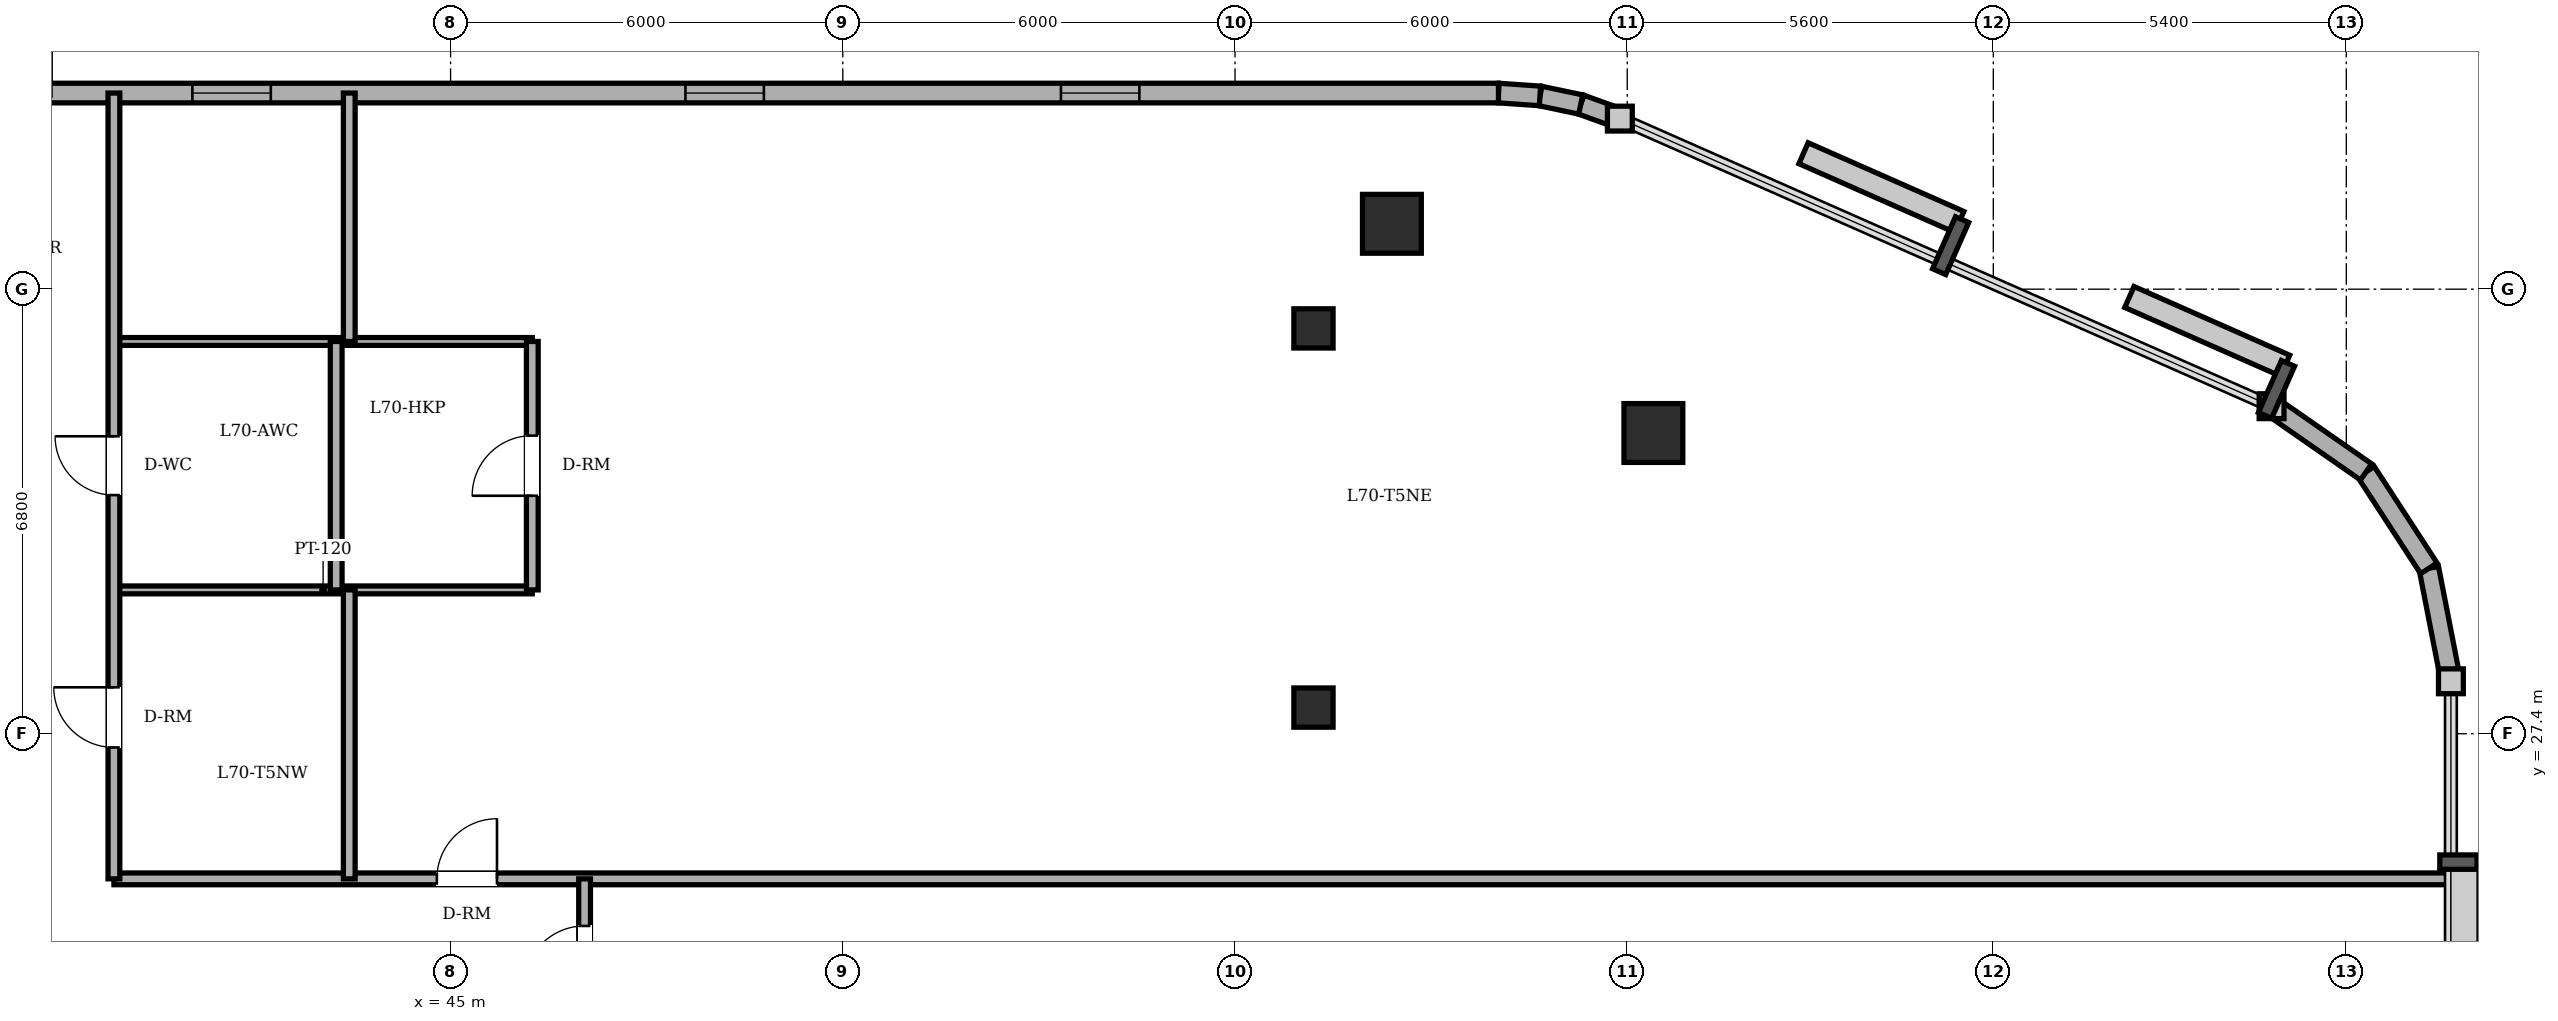
"""IFC4 building model, lengths in metres.
Left out: names, types, materials, properties, quantities, classifications, styles, units other than length and angle.
Written with IfcOpenShell. Run it as: python <this file> out.ifc"""

import sys

from ifc_helpers import new_model, si_unit, direction, frame, frame_2d, origin, origin_2d, place, context, subcontext, project, spatial, rectangle, circle, extrude, element, fill, save


model = new_model("IFC4")
c1 = context("Model", 3, precision=1e-05, world=origin(), true_north=direction((0.0, 1.0)))
c2 = subcontext(c1, "Body", "Model", "MODEL_VIEW")
j1 = project(units=[si_unit("LENGTHUNIT", "METRE"), si_unit("PLANEANGLEUNIT", "RADIAN")], contexts=[c1])
p1 = place(None, origin())
s1 = spatial("IfcSite", under=j1, at=p1, CompositionType="ELEMENT")
p2 = place(p1, origin())
s2 = spatial("IfcBuilding", under=s1, at=p2, CompositionType="ELEMENT")
p3 = place(p2, frame((0.0, 0.0, 269.75)))
s3 = spatial("IfcBuildingStorey", under=s2, at=p3, CompositionType="ELEMENT", Elevation=269.75)
for number, where, z_axis, x_axis in (
    (1, (63.4, 32.0, 0.0), (0.0, 0.0, 1.0), (1.0, 0.0, 0.0)),
    (2, (59.4, 35.2, 0.0), (0.0, 0.0, 1.0), (1.0, 0.0, 0.0)),
):
    element("IfcColumn", number, at=place(p3, frame(where, z_axis=z_axis, x_axis=x_axis)), inside=s3, PredefinedType="COLUMN", context=c2, shape_type="SweptSolid", body=[
        extrude(circle(Radius=0.45, at=origin_2d()), origin(), (0.0, 0.0, 1.0), 3.65),
    ])
for number, where, z_axis, x_axis in (
    (3, (58.2, 27.8, 0.0), (0.0, 0.0, 1.0), (1.0, 0.0, 0.0)),
    (4, (58.2, 33.6, 0.0), (0.0, 0.0, 1.0), (1.0, 0.0, 0.0)),
):
    element("IfcColumn", number, at=place(p3, frame(where, z_axis=z_axis, x_axis=x_axis)), inside=s3, PredefinedType="COLUMN", context=c2, shape_type="SweptSolid", body=[
        extrude(rectangle(XDim=0.6, YDim=0.6, at=origin_2d()), origin(), (0.0, 0.0, 1.0), 3.65),
    ])
for number, where, z_axis, x_axis in (
    (5, (75.6, 28.202, 0.0), (0.0, 0.0, 1.0), (-0.192, 0.981, 0.0)),
    (6, (75.263, 29.93, 0.0), (0.0, 0.0, 1.0), (-0.546, 0.838, 0.0)),
):
    element("IfcWall", number, at=place(p3, frame(where, z_axis=z_axis, x_axis=x_axis)), inside=s3, PredefinedType="SOLIDWALL", context=c2, shape_type="SweptSolid", body=[
        extrude(rectangle(XDim=1.76, YDim=0.3, at=frame_2d((0.88, 0.0))), origin(), (0.0, 0.0, 1.0), 3.45),
    ])
p4 = place(p3, frame((74.302, 31.405, 0.0), z_axis=(0.0, 0.0, 1.0), x_axis=(-0.821006966142, 0.570918174124, 0.0)))
e7 = element("IfcWall", 7, at=p4, inside=s3, PredefinedType="SOLIDWALL", context=c2, shape_type="SweptSolid", body=[
    extrude(rectangle(XDim=1.76, YDim=0.3, at=frame_2d((0.88, 0.0))), origin(), (0.0, 0.0, 1.0), 3.45),
])
p5 = place(p3, frame((62.887, 36.809, 0.0), z_axis=(0.0, 0.0, 1.0), x_axis=(-0.94077491148, 0.339031806665, 0.0)))
e8 = element("IfcWall", 8, at=p5, inside=s3, PredefinedType="SOLIDWALL", context=c2, shape_type="SweptSolid", body=[
    extrude(rectangle(XDim=0.636, YDim=0.3, at=frame_2d((0.318, 0.0))), origin(), (0.0, 0.0, 1.0), 3.45),
])
p6 = place(p3, frame((62.288, 37.025, 0.0), z_axis=(0.0, 0.0, 1.0), x_axis=(-0.97857012251, 0.205913854149, 0.0)))
e9 = element("IfcWall", 9, at=p6, inside=s3, PredefinedType="SOLIDWALL", context=c2, shape_type="SweptSolid", body=[
    extrude(rectangle(XDim=0.637, YDim=0.3, at=frame_2d((0.318, 0.0))), origin(), (0.0, 0.0, 1.0), 3.45),
])
p7 = place(p3, frame((61.665, 37.156, 0.0), z_axis=(0.0, 0.0, 1.0), x_axis=(-0.997613959688, 0.069039028352, 0.0)))
e10 = element("IfcWall", 10, at=p7, inside=s3, PredefinedType="SOLIDWALL", context=c2, shape_type="SweptSolid", body=[
    extrude(rectangle(XDim=0.636, YDim=0.3, at=frame_2d((0.318, 0.0))), origin(), (0.0, 0.0, 1.0), 3.45),
])
p8 = place(p3, frame((61.03, 37.2, 0.0), z_axis=(0.0, 0.0, 1.0), x_axis=(-1.0, 0.0, 0.0)))
e11 = element("IfcWall", 11, at=p8, inside=s3, PredefinedType="SOLIDWALL", context=c2, shape_type="SweptSolid", body=[
    extrude(rectangle(XDim=37.03, YDim=0.3, at=frame_2d((18.515, 0.0))), origin(), (0.0, 0.0, 1.0), 3.45),
])
p9 = place(p8, frame((31.03, 0.0, 0.0)))
e12 = element("IfcOpeningElement", 12, at=p9, cuts=e11, PredefinedType="OPENING", context=c2, shape_type="SweptSolid", body=[
    extrude(rectangle(XDim=0.95, YDim=2.2, at=frame_2d((0.475, 1.1))), frame((0.0, 0.16, 0.0), z_axis=(0.0, -1.0, 0.0), x_axis=(1.0, 0.0, 0.0)), (0.0, 0.0, 1.0), 0.32),
])
p10 = place(p8, frame((5.493, 0.0, 0.85)))
e13 = element("IfcOpeningElement", 13, at=p10, cuts=e11, PredefinedType="OPENING", context=c2, shape_type="SweptSolid", body=[
    extrude(rectangle(XDim=1.2, YDim=1.6, at=frame_2d((0.6, 0.8))), frame((0.0, 0.16, 0.0), z_axis=(0.0, -1.0, 0.0), x_axis=(1.0, 0.0, 0.0)), (0.0, 0.0, 1.0), 0.32),
])
p11 = place(p8, frame((11.237, 0.0, 0.85)))
e14 = element("IfcOpeningElement", 14, at=p11, cuts=e11, PredefinedType="OPENING", context=c2, shape_type="SweptSolid", body=[
    extrude(rectangle(XDim=1.2, YDim=1.6, at=frame_2d((0.6, 0.8))), frame((0.0, 0.16, 0.0), z_axis=(0.0, -1.0, 0.0), x_axis=(1.0, 0.0, 0.0)), (0.0, 0.0, 1.0), 0.32),
])
p12 = place(p8, frame((18.78, 0.0, 0.85)))
e15 = element("IfcOpeningElement", 15, at=p12, cuts=e11, PredefinedType="OPENING", context=c2, shape_type="SweptSolid", body=[
    extrude(rectangle(XDim=1.2, YDim=1.6, at=frame_2d((0.6, 0.8))), frame((0.0, 0.16, 0.0), z_axis=(0.0, -1.0, 0.0), x_axis=(1.0, 0.0, 0.0)), (0.0, 0.0, 1.0), 0.32),
])
p13 = place(p8, frame((25.747, 0.0, 0.85)))
e16 = element("IfcOpeningElement", 16, at=p13, cuts=e11, PredefinedType="OPENING", context=c2, shape_type="SweptSolid", body=[
    extrude(rectangle(XDim=1.2, YDim=1.6, at=frame_2d((0.6, 0.8))), frame((0.0, 0.16, 0.0), z_axis=(0.0, -1.0, 0.0), x_axis=(1.0, 0.0, 0.0)), (0.0, 0.0, 1.0), 0.32),
])
p14 = place(p3, frame((39.85, 25.18, 0.0), z_axis=(0.0, 0.0, 1.0), x_axis=(1.0, 0.0, 0.0)))
e17 = element("IfcWall", 17, at=p14, inside=s3, PredefinedType="PARTITIONING", context=c2, shape_type="SweptSolid", body=[
    extrude(rectangle(XDim=35.75, YDim=0.18, at=frame_2d((17.875, 0.0))), origin(), (0.0, 0.0, 1.0), 3.45),
])
p15 = place(p14, frame((4.94, 0.0, 0.0)))
e18 = element("IfcOpeningElement", 18, at=p15, cuts=e17, PredefinedType="OPENING", context=c2, shape_type="SweptSolid", body=[
    extrude(rectangle(XDim=0.92, YDim=2.1, at=frame_2d((0.46, 1.05))), frame((0.0, 0.1, 0.0), z_axis=(0.0, -1.0, 0.0), x_axis=(1.0, 0.0, 0.0)), (0.0, 0.0, 1.0), 0.2),
])
p16 = place(p3, frame((39.85, 29.6, 0.0), z_axis=(0.0, 0.0, 1.0), x_axis=(1.0, 0.0, 0.0)))
e19 = element("IfcWall", 19, at=p16, inside=s3, PredefinedType="PARTITIONING", context=c2, shape_type="SweptSolid", body=[
    extrude(rectangle(XDim=6.4, YDim=0.12, at=frame_2d((3.2, 0.0))), origin(), (0.0, 0.0, 1.0), 3.45),
])
p17 = place(p3, frame((39.85, 33.4, 0.0), z_axis=(0.0, 0.0, 1.0), x_axis=(1.0, 0.0, 0.0)))
e20 = element("IfcWall", 20, at=p17, inside=s3, PredefinedType="PARTITIONING", context=c2, shape_type="SweptSolid", body=[
    extrude(rectangle(XDim=6.4, YDim=0.12, at=frame_2d((3.2, 0.0))), origin(), (0.0, 0.0, 1.0), 3.092),
])
p18 = place(p3, frame((39.85, 25.18, 0.0), z_axis=(0.0, 0.0, 1.0), x_axis=(0.0, 1.0, 0.0)))
e21 = element("IfcWall", 21, at=p18, inside=s3, PredefinedType="PARTITIONING", context=c2, shape_type="SweptSolid", body=[
    extrude(rectangle(XDim=12.02, YDim=0.18, at=frame_2d((6.01, 0.0))), origin(), (0.0, 0.0, 1.0), 3.45),
])
p19 = place(p18, frame((5.87, 0.0, 0.0)))
e22 = element("IfcOpeningElement", 22, at=p19, cuts=e21, PredefinedType="OPENING", context=c2, shape_type="SweptSolid", body=[
    extrude(rectangle(XDim=0.9, YDim=2.1, at=frame_2d((0.45, 1.05))), frame((0.0, 0.1, 0.0), z_axis=(0.0, -1.0, 0.0), x_axis=(1.0, 0.0, 0.0)), (0.0, 0.0, 1.0), 0.2),
])
p20 = place(p18, frame((2.01, 0.0, 0.0)))
e23 = element("IfcOpeningElement", 23, at=p20, cuts=e21, PredefinedType="OPENING", context=c2, shape_type="SweptSolid", body=[
    extrude(rectangle(XDim=0.92, YDim=2.1, at=frame_2d((0.46, 1.05))), frame((0.0, 0.1, 0.0), z_axis=(0.0, -1.0, 0.0), x_axis=(1.0, 0.0, 0.0)), (0.0, 0.0, 1.0), 0.2),
])
p21 = place(p3, frame((43.25, 29.6, 0.0), z_axis=(0.0, 0.0, 1.0), x_axis=(0.0, 1.0, 0.0)))
e24 = element("IfcWall", 24, at=p21, inside=s3, PredefinedType="PARTITIONING", context=c2, shape_type="SweptSolid", body=[
    extrude(rectangle(XDim=3.8, YDim=0.18, at=frame_2d((1.9, 0.0))), origin(), (0.0, 0.0, 1.0), 3.45),
])
p22 = place(p3, frame((43.45, 25.18, 0.0), z_axis=(0.0, 0.0, 1.0), x_axis=(0.0, 1.0, 0.0)))
e25 = element("IfcWall", 25, at=p22, inside=s3, PredefinedType="PARTITIONING", context=c2, shape_type="SweptSolid", body=[
    extrude(rectangle(XDim=4.42, YDim=0.18, at=frame_2d((2.21, 0.0))), origin(), (0.0, 0.0, 1.0), 3.45),
])
p23 = place(p3, frame((43.45, 33.4, 0.0), z_axis=(0.0, 0.0, 1.0), x_axis=(0.0, 1.0, 0.0)))
e26 = element("IfcWall", 26, at=p23, inside=s3, PredefinedType="PARTITIONING", context=c2, shape_type="SweptSolid", body=[
    extrude(rectangle(XDim=3.8, YDim=0.18, at=frame_2d((1.9, 0.0))), origin(), (0.0, 0.0, 1.0), 3.45),
])
p24 = place(p3, frame((46.25, 29.6, 0.0), z_axis=(0.0, 0.0, 1.0), x_axis=(0.0, 1.0, 0.0)))
e27 = element("IfcWall", 27, at=p24, inside=s3, PredefinedType="PARTITIONING", context=c2, shape_type="SweptSolid", body=[
    extrude(rectangle(XDim=3.8, YDim=0.18, at=frame_2d((1.9, 0.0))), origin(), (0.0, 0.0, 1.0), 3.45),
])
p25 = place(p24, frame((1.44, 0.0, 0.0)))
e28 = element("IfcOpeningElement", 28, at=p25, cuts=e27, PredefinedType="OPENING", context=c2, shape_type="SweptSolid", body=[
    extrude(rectangle(XDim=0.92, YDim=2.1, at=frame_2d((0.46, 1.05))), frame((0.0, 0.1, 0.0), z_axis=(0.0, -1.0, 0.0), x_axis=(1.0, 0.0, 0.0)), (0.0, 0.0, 1.0), 0.2),
])
p26 = place(p3, frame((47.05, 22.82, 0.0), z_axis=(0.0, 0.0, 1.0), x_axis=(0.0, 1.0, 0.0)))
e29 = element("IfcWall", 29, at=p26, inside=s3, PredefinedType="PARTITIONING", context=c2, shape_type="SweptSolid", body=[
    extrude(rectangle(XDim=2.36, YDim=0.18, at=frame_2d((1.18, 0.0))), origin(), (0.0, 0.0, 1.0), 3.45),
])
p27 = place(p26, frame((0.72, 0.0, 0.0)))
e30 = element("IfcOpeningElement", 30, at=p27, cuts=e29, PredefinedType="OPENING", context=c2, shape_type="SweptSolid", body=[
    extrude(rectangle(XDim=0.92, YDim=2.1, at=frame_2d((0.46, 1.05))), frame((0.0, 0.1, 0.0), z_axis=(0.0, -1.0, 0.0), x_axis=(1.0, 0.0, 0.0)), (0.0, 0.0, 1.0), 0.2),
])
p28 = place(p10, origin())
e31 = element("IfcWindow", 31, at=p28, inside=s3, PartitioningType="SINGLE_PANEL", PredefinedType="WINDOW", context=c2, shape_type="SweptSolid", body=[
    extrude(rectangle(XDim=1.2, YDim=1.6, at=frame_2d((0.6, 0.8))), frame((0.0, 0.03, 0.0), z_axis=(0.0, -1.0, 0.0), x_axis=(1.0, 0.0, 0.0)), (0.0, 0.0, 1.0), 0.06),
])
fill(e13, e31)
p29 = place(p11, origin())
e32 = element("IfcWindow", 32, at=p29, inside=s3, PartitioningType="SINGLE_PANEL", PredefinedType="WINDOW", context=c2, shape_type="SweptSolid", body=[
    extrude(rectangle(XDim=1.2, YDim=1.6, at=frame_2d((0.6, 0.8))), frame((0.0, 0.03, 0.0), z_axis=(0.0, -1.0, 0.0), x_axis=(1.0, 0.0, 0.0)), (0.0, 0.0, 1.0), 0.06),
])
fill(e14, e32)
p30 = place(p12, origin())
e33 = element("IfcWindow", 33, at=p30, inside=s3, PartitioningType="SINGLE_PANEL", PredefinedType="WINDOW", context=c2, shape_type="SweptSolid", body=[
    extrude(rectangle(XDim=1.2, YDim=1.6, at=frame_2d((0.6, 0.8))), frame((0.0, 0.03, 0.0), z_axis=(0.0, -1.0, 0.0), x_axis=(1.0, 0.0, 0.0)), (0.0, 0.0, 1.0), 0.06),
])
fill(e15, e33)
p31 = place(p19, origin())
e34 = element("IfcDoor", 34, at=p31, inside=s3, OperationType="SINGLE_SWING_RIGHT", PredefinedType="DOOR", context=c2, shape_type="SweptSolid", body=[
    extrude(rectangle(XDim=0.9, YDim=2.1, at=frame_2d((0.45, 1.05))), frame((0.0, 0.025, 0.0), z_axis=(0.0, -1.0, 0.0), x_axis=(1.0, 0.0, 0.0)), (0.0, 0.0, 1.0), 0.05),
])
fill(e22, e34)
p32 = place(p20, origin())
e35 = element("IfcDoor", 35, at=p32, inside=s3, OperationType="SINGLE_SWING_RIGHT", PredefinedType="DOOR", context=c2, shape_type="SweptSolid", body=[
    extrude(rectangle(XDim=0.92, YDim=2.1, at=frame_2d((0.46, 1.05))), frame((0.0, 0.025, 0.0), z_axis=(0.0, -1.0, 0.0), x_axis=(1.0, 0.0, 0.0)), (0.0, 0.0, 1.0), 0.05),
])
fill(e23, e35)
p33 = place(p15, origin())
e36 = element("IfcDoor", 36, at=p33, inside=s3, OperationType="SINGLE_SWING_RIGHT", PredefinedType="DOOR", context=c2, shape_type="SweptSolid", body=[
    extrude(rectangle(XDim=0.92, YDim=2.1, at=frame_2d((0.46, 1.05))), frame((0.0, 0.025, 0.0), z_axis=(0.0, -1.0, 0.0), x_axis=(1.0, 0.0, 0.0)), (0.0, 0.0, 1.0), 0.05),
])
fill(e18, e36)
p34 = place(p27, origin())
e37 = element("IfcDoor", 37, at=p34, inside=s3, OperationType="SINGLE_SWING_LEFT", PredefinedType="DOOR", context=c2, shape_type="SweptSolid", body=[
    extrude(rectangle(XDim=0.92, YDim=2.1, at=frame_2d((0.46, 1.05))), frame((0.0, 0.025, 0.0), z_axis=(0.0, -1.0, 0.0), x_axis=(1.0, 0.0, 0.0)), (0.0, 0.0, 1.0), 0.05),
])
fill(e30, e37)
p35 = place(p25, origin())
e38 = element("IfcDoor", 38, at=p35, inside=s3, OperationType="SINGLE_SWING_LEFT", PredefinedType="DOOR", context=c2, shape_type="SweptSolid", body=[
    extrude(rectangle(XDim=0.92, YDim=2.1, at=frame_2d((0.46, 1.05))), frame((0.0, 0.025, 0.0), z_axis=(0.0, -1.0, 0.0), x_axis=(1.0, 0.0, 0.0)), (0.0, 0.0, 1.0), 0.05),
])
fill(e28, e38)
save(model, sys.argv[1])
